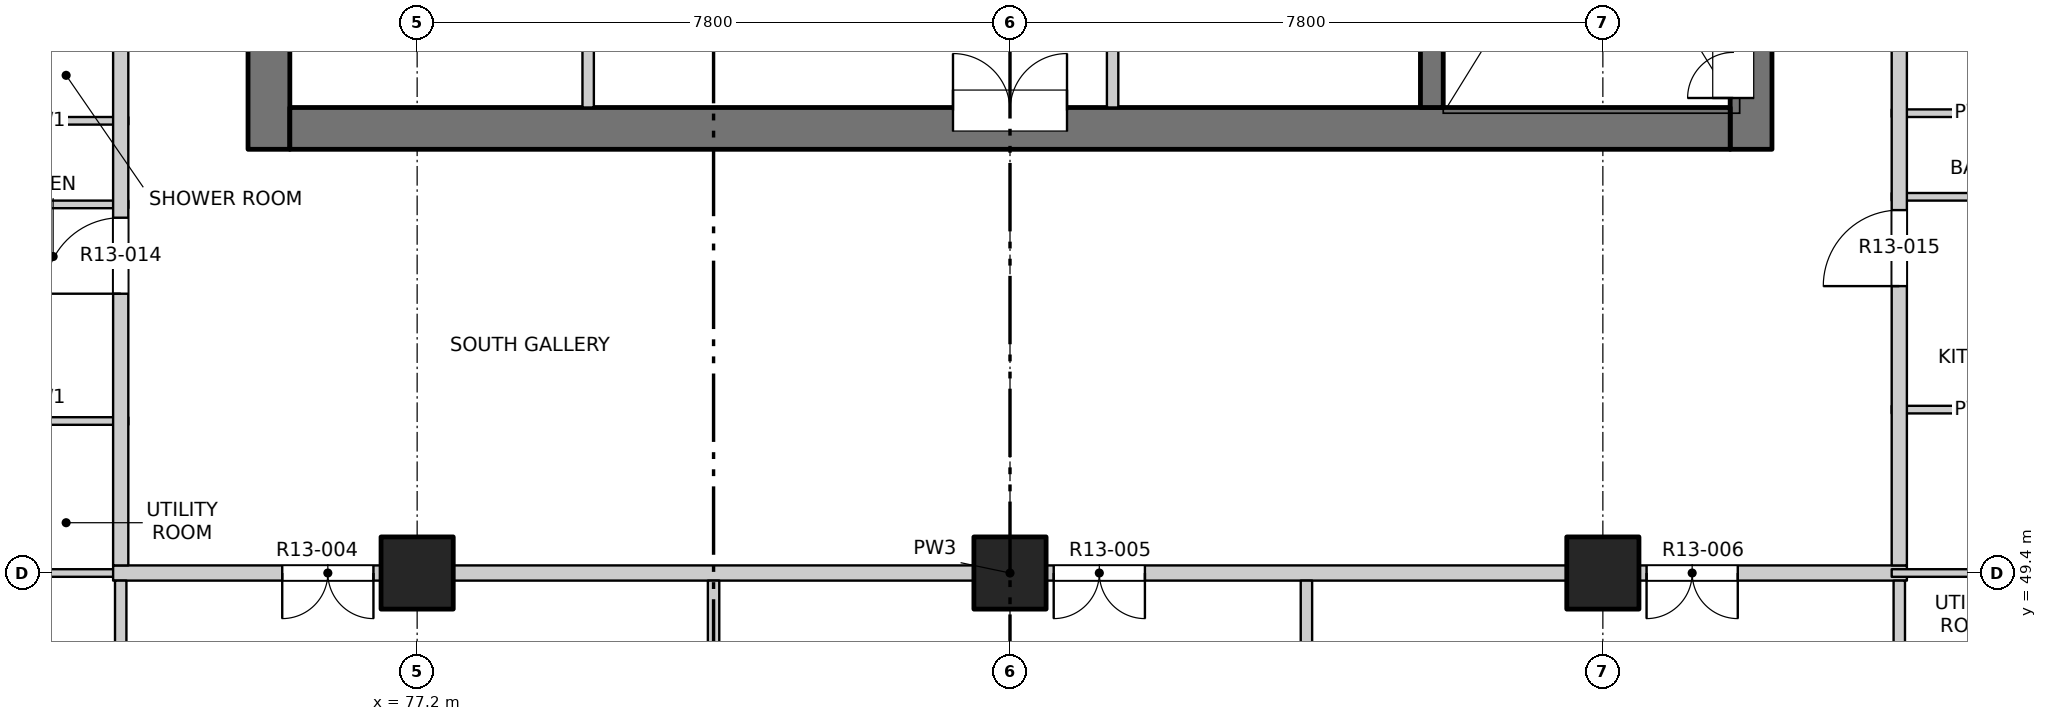
"""IFC4 building model, lengths in metres.
Left out: names, types, materials, properties, quantities, classifications, styles, units other than length and angle.
Written with IfcOpenShell. Run it as: python <this file> out.ifc"""

import sys

from ifc_helpers import new_model, si_unit, direction, frame, frame_2d, origin, origin_2d, place, context, subcontext, project, spatial, rectangle, extrude, element, fill, save


model = new_model("IFC4")
c1 = context("Model", 3, precision=1e-05, world=origin(), true_north=direction((0.0, 1.0)))
c2 = subcontext(c1, "Body", "Model", "MODEL_VIEW")
j1 = project(units=[si_unit("LENGTHUNIT", "METRE"), si_unit("PLANEANGLEUNIT", "RADIAN")], contexts=[c1])
p1 = place(None, origin())
s1 = spatial("IfcSite", under=j1, at=p1, CompositionType="ELEMENT")
p2 = place(p1, origin())
s2 = spatial("IfcBuilding", under=s1, at=p2, CompositionType="ELEMENT")
p3 = place(p2, frame((0.0, 0.0, 140.7)))
s3 = spatial("IfcBuildingStorey", under=s2, at=p3, CompositionType="ELEMENT", Elevation=140.7)
for number, where, z_axis, x_axis in (
    (1, (77.2, 49.4, -0.25), (0.0, 0.0, 1.0), (1.0, 0.0, 0.0)),
    (2, (85.0, 49.4, -0.25), (0.0, 0.0, 1.0), (1.0, 0.0, 0.0)),
    (3, (92.8, 49.4, -0.25), (0.0, 0.0, 1.0), (1.0, 0.0, 0.0)),
):
    element("IfcColumn", number, at=place(p3, frame(where, z_axis=z_axis, x_axis=x_axis)), inside=s3, PredefinedType="COLUMN", context=c2, shape_type="SweptSolid", body=[
        extrude(rectangle(XDim=0.95, YDim=0.95, at=origin_2d()), origin(), (0.0, 0.0, 1.0), 3.35),
    ])
p4 = place(p3, frame((75.25, 54.975, -0.25), z_axis=(0.0, 0.0, 1.0), x_axis=(0.0, 1.0, 0.0)))
e4 = element("IfcWall", 4, at=p4, inside=s3, PredefinedType="SOLIDWALL", context=c2, shape_type="SweptSolid", body=[
    extrude(rectangle(XDim=22.325, YDim=0.55, at=frame_2d((11.163, 0.0))), origin(), (0.0, 0.0, 1.0), 3.35),
])
p5 = place(p4, frame((7.475, 0.0, 0.25)))
e5 = element("IfcOpeningElement", 5, at=p5, cuts=e4, PredefinedType="OPENING", context=c2, shape_type="SweptSolid", body=[
    extrude(rectangle(XDim=0.9, YDim=2.1, at=frame_2d((0.45, 1.05))), frame((0.0, 0.285, 0.0), z_axis=(0.0, -1.0, 0.0), x_axis=(1.0, 0.0, 0.0)), (0.0, 0.0, 1.0), 0.57),
])
p6 = place(p4, frame((10.775, 0.0, 0.25)))
e6 = element("IfcOpeningElement", 6, at=p6, cuts=e4, PredefinedType="OPENING", context=c2, shape_type="SweptSolid", body=[
    extrude(rectangle(XDim=0.9, YDim=2.1, at=frame_2d((0.45, 1.05))), frame((0.0, 0.285, 0.0), z_axis=(0.0, -1.0, 0.0), x_axis=(1.0, 0.0, 0.0)), (0.0, 0.0, 1.0), 0.57),
])
p7 = place(p4, frame((13.775, 0.0, 0.25)))
e7 = element("IfcOpeningElement", 7, at=p7, cuts=e4, PredefinedType="OPENING", context=c2, shape_type="SweptSolid", body=[
    extrude(rectangle(XDim=0.9, YDim=2.1, at=frame_2d((0.45, 1.05))), frame((0.0, 0.285, 0.0), z_axis=(0.0, -1.0, 0.0), x_axis=(1.0, 0.0, 0.0)), (0.0, 0.0, 1.0), 0.57),
])
p8 = place(p4, frame((16.775, 0.0, 0.25)))
e8 = element("IfcOpeningElement", 8, at=p8, cuts=e4, PredefinedType="OPENING", context=c2, shape_type="SweptSolid", body=[
    extrude(rectangle(XDim=0.9, YDim=2.1, at=frame_2d((0.45, 1.05))), frame((0.0, 0.285, 0.0), z_axis=(0.0, -1.0, 0.0), x_axis=(1.0, 0.0, 0.0)), (0.0, 0.0, 1.0), 0.57),
])
p9 = place(p4, frame((20.075, 0.0, 0.25)))
e9 = element("IfcOpeningElement", 9, at=p9, cuts=e4, PredefinedType="OPENING", context=c2, shape_type="SweptSolid", body=[
    extrude(rectangle(XDim=0.9, YDim=2.1, at=frame_2d((0.45, 1.05))), frame((0.0, 0.285, 0.0), z_axis=(0.0, -1.0, 0.0), x_axis=(1.0, 0.0, 0.0)), (0.0, 0.0, 1.0), 0.57),
])
p10 = place(p3, frame((94.75, 54.975, -0.25), z_axis=(0.0, 0.0, 1.0), x_axis=(0.0, 1.0, 0.0)))
e10 = element("IfcWall", 10, at=p10, inside=s3, PredefinedType="SOLIDWALL", context=c2, shape_type="SweptSolid", body=[
    extrude(rectangle(XDim=6.975, YDim=0.55, at=frame_2d((3.487, 0.0))), origin(), (0.0, 0.0, 1.0), 3.35),
])
p11 = place(p10, frame((0.675, 0.0, 0.25)))
e11 = element("IfcOpeningElement", 11, at=p11, cuts=e10, PredefinedType="OPENING", context=c2, shape_type="SweptSolid", body=[
    extrude(rectangle(XDim=1.2, YDim=2.1, at=frame_2d((0.6, 1.05))), frame((0.0, 0.285, 0.0), z_axis=(0.0, -1.0, 0.0), x_axis=(1.0, 0.0, 0.0)), (0.0, 0.0, 1.0), 0.57),
])
p12 = place(p3, frame((75.525, 55.25, -0.25), z_axis=(0.0, 0.0, 1.0), x_axis=(1.0, 0.0, 0.0)))
e12 = element("IfcWall", 12, at=p12, inside=s3, PredefinedType="SOLIDWALL", context=c2, shape_type="SweptSolid", body=[
    extrude(rectangle(XDim=18.95, YDim=0.55, at=frame_2d((9.475, 0.0))), origin(), (0.0, 0.0, 1.0), 3.35),
])
p13 = place(p12, frame((8.725, 0.0, 0.25)))
e13 = element("IfcOpeningElement", 13, at=p13, cuts=e12, PredefinedType="OPENING", context=c2, shape_type="SweptSolid", body=[
    extrude(rectangle(XDim=1.5, YDim=2.1, at=frame_2d((0.75, 1.05))), frame((0.0, 0.285, 0.0), z_axis=(0.0, -1.0, 0.0), x_axis=(1.0, 0.0, 0.0)), (0.0, 0.0, 1.0), 0.57),
])
p14 = place(p3, frame((90.55, 55.525, -0.25), z_axis=(0.0, 0.0, 1.0), x_axis=(0.0, 1.0, 0.0)))
e14 = element("IfcWall", 14, at=p14, inside=s3, PredefinedType="SOLIDWALL", context=c2, shape_type="SweptSolid", body=[
    extrude(rectangle(XDim=6.425, YDim=0.3, at=frame_2d((3.212, 0.0))), origin(), (0.0, 0.0, 1.0), 3.35),
])
p15 = place(p3, frame((65.8, 49.4, 0.0), z_axis=(0.0, 0.0, 1.0), x_axis=(1.0, 0.0, 0.0)))
e15 = element("IfcWall", 15, at=p15, inside=s3, PredefinedType="PARTITIONING", context=c2, shape_type="SweptSolid", body=[
    extrude(rectangle(XDim=7.6, YDim=0.1, at=frame_2d((3.8, 0.0))), origin(), (0.0, 0.0, 1.0), 3.1),
])
p16 = place(p15, frame((4.19, 0.0, 0.0)))
e16 = element("IfcOpeningElement", 16, at=p16, cuts=e15, PredefinedType="OPENING", context=c2, shape_type="SweptSolid", body=[
    extrude(rectangle(XDim=0.9, YDim=2.1, at=frame_2d((0.45, 1.05))), frame((0.0, 0.06, 0.0), z_axis=(0.0, -1.0, 0.0), x_axis=(1.0, 0.0, 0.0)), (0.0, 0.0, 1.0), 0.12),
])
p17 = place(p3, frame((73.2, 49.4, 0.0), z_axis=(0.0, 0.0, 1.0), x_axis=(1.0, 0.0, 0.0)))
e17 = element("IfcWall", 17, at=p17, inside=s3, PredefinedType="PARTITIONING", context=c2, shape_type="SweptSolid", body=[
    extrude(rectangle(XDim=23.6, YDim=0.2, at=frame_2d((11.8, 0.0))), origin(), (0.0, 0.0, 1.0), 3.1),
])
p18 = place(p17, frame((2.225, 0.0, 0.0)))
e18 = element("IfcOpeningElement", 18, at=p18, cuts=e17, PredefinedType="OPENING", context=c2, shape_type="SweptSolid", body=[
    extrude(rectangle(XDim=1.2, YDim=2.1, at=frame_2d((0.6, 1.05))), frame((0.0, 0.11, 0.0), z_axis=(0.0, -1.0, 0.0), x_axis=(1.0, 0.0, 0.0)), (0.0, 0.0, 1.0), 0.22),
])
p19 = place(p17, frame((12.375, 0.0, 0.0)))
e19 = element("IfcOpeningElement", 19, at=p19, cuts=e17, PredefinedType="OPENING", context=c2, shape_type="SweptSolid", body=[
    extrude(rectangle(XDim=1.2, YDim=2.1, at=frame_2d((0.6, 1.05))), frame((0.0, 0.11, 0.0), z_axis=(0.0, -1.0, 0.0), x_axis=(1.0, 0.0, 0.0)), (0.0, 0.0, 1.0), 0.22),
])
p20 = place(p17, frame((20.175, 0.0, 0.0)))
e20 = element("IfcOpeningElement", 20, at=p20, cuts=e17, PredefinedType="OPENING", context=c2, shape_type="SweptSolid", body=[
    extrude(rectangle(XDim=1.2, YDim=2.1, at=frame_2d((0.6, 1.05))), frame((0.0, 0.11, 0.0), z_axis=(0.0, -1.0, 0.0), x_axis=(1.0, 0.0, 0.0)), (0.0, 0.0, 1.0), 0.22),
])
p21 = place(p3, frame((96.6, 49.4, 0.0), z_axis=(0.0, 0.0, 1.0), x_axis=(1.0, 0.0, 0.0)))
e21 = element("IfcWall", 21, at=p21, inside=s3, PredefinedType="PARTITIONING", context=c2, shape_type="SweptSolid", body=[
    extrude(rectangle(XDim=7.6, YDim=0.1, at=frame_2d((3.8, 0.0))), origin(), (0.0, 0.0, 1.0), 3.1),
])
p22 = place(p21, frame((2.51, 0.0, 0.0)))
e22 = element("IfcOpeningElement", 22, at=p22, cuts=e21, PredefinedType="OPENING", context=c2, shape_type="SweptSolid", body=[
    extrude(rectangle(XDim=0.9, YDim=2.1, at=frame_2d((0.45, 1.05))), frame((0.0, 0.06, 0.0), z_axis=(0.0, -1.0, 0.0), x_axis=(1.0, 0.0, 0.0)), (0.0, 0.0, 1.0), 0.12),
])
for number, where, z_axis, x_axis in (
    (23, (71.18, 51.4, 0.0), (0.0, 0.0, 1.0), (1.0, 0.0, 0.0)),
    (24, (96.6, 51.55, 0.0), (0.0, 0.0, 1.0), (1.0, 0.0, 0.0)),
    (25, (71.18, 54.25, 0.0), (0.0, 0.0, 1.0), (1.0, 0.0, 0.0)),
    (26, (96.6, 54.35, 0.0), (0.0, 0.0, 1.0), (1.0, 0.0, 0.0)),
    (27, (71.18, 55.35, 0.0), (0.0, 0.0, 1.0), (1.0, 0.0, 0.0)),
    (28, (96.6, 55.45, 0.0), (0.0, 0.0, 1.0), (1.0, 0.0, 0.0)),
):
    element("IfcWall", number, at=place(p3, frame(where, z_axis=z_axis, x_axis=x_axis)), inside=s3, PredefinedType="PARTITIONING", context=c2, shape_type="SweptSolid", body=[
        extrude(rectangle(XDim=2.22, YDim=0.1, at=frame_2d((1.11, 0.0))), origin(), (0.0, 0.0, 1.0), 3.1),
    ])
p23 = place(p3, frame((73.3, 45.8, 0.0), z_axis=(0.0, 0.0, 1.0), x_axis=(0.0, 1.0, 0.0)))
e29 = element("IfcWall", 29, at=p23, inside=s3, PredefinedType="PARTITIONING", context=c2, shape_type="SweptSolid", body=[
    extrude(rectangle(XDim=3.5, YDim=0.15, at=frame_2d((1.75, 0.0))), origin(), (0.0, 0.0, 1.0), 3.1),
])
p24 = place(p3, frame((73.3, 49.5, 0.0), z_axis=(0.0, 0.0, 1.0), x_axis=(0.0, 1.0, 0.0)))
e30 = element("IfcWall", 30, at=p24, inside=s3, PredefinedType="PARTITIONING", context=c2, shape_type="SweptSolid", body=[
    extrude(rectangle(XDim=34.7, YDim=0.2, at=frame_2d((17.35, 0.0))), origin(), (0.0, 0.0, 1.0), 3.1),
])
p25 = place(p24, frame((3.575, 0.0, 0.0)))
e31 = element("IfcOpeningElement", 31, at=p25, cuts=e30, PredefinedType="OPENING", context=c2, shape_type="SweptSolid", body=[
    extrude(rectangle(XDim=1.0, YDim=2.1, at=frame_2d((0.5, 1.05))), frame((0.0, 0.11, 0.0), z_axis=(0.0, -1.0, 0.0), x_axis=(1.0, 0.0, 0.0)), (0.0, 0.0, 1.0), 0.22),
])
p26 = place(p24, frame((21.975, 0.0, 0.0)))
e32 = element("IfcOpeningElement", 32, at=p26, cuts=e30, PredefinedType="OPENING", context=c2, shape_type="SweptSolid", body=[
    extrude(rectangle(XDim=1.0, YDim=2.1, at=frame_2d((0.5, 1.05))), frame((0.0, 0.11, 0.0), z_axis=(0.0, -1.0, 0.0), x_axis=(1.0, 0.0, 0.0)), (0.0, 0.0, 1.0), 0.22),
])
p27 = place(p24, frame((29.125, 0.0, 0.0)))
e33 = element("IfcOpeningElement", 33, at=p27, cuts=e30, PredefinedType="OPENING", context=c2, shape_type="SweptSolid", body=[
    extrude(rectangle(XDim=1.0, YDim=2.1, at=frame_2d((0.5, 1.05))), frame((0.0, 0.11, 0.0), z_axis=(0.0, -1.0, 0.0), x_axis=(1.0, 0.0, 0.0)), (0.0, 0.0, 1.0), 0.22),
])
p28 = place(p3, frame((79.45, 55.525, 0.0), z_axis=(0.0, 0.0, 1.0), x_axis=(0.0, 1.0, 0.0)))
e34 = element("IfcWall", 34, at=p28, inside=s3, PredefinedType="PARTITIONING", context=c2, shape_type="SweptSolid", body=[
    extrude(rectangle(XDim=5.375, YDim=0.15, at=frame_2d((2.688, 0.0))), origin(), (0.0, 0.0, 1.0), 3.1),
])
p29 = place(p28, frame((2.175, 0.0, 0.0)))
e35 = element("IfcOpeningElement", 35, at=p29, cuts=e34, PredefinedType="OPENING", context=c2, shape_type="SweptSolid", body=[
    extrude(rectangle(XDim=0.9, YDim=2.1, at=frame_2d((0.45, 1.05))), frame((0.0, 0.085, 0.0), z_axis=(0.0, -1.0, 0.0), x_axis=(1.0, 0.0, 0.0)), (0.0, 0.0, 1.0), 0.17),
])
p30 = place(p3, frame((81.1, 45.8, 0.0), z_axis=(0.0, 0.0, 1.0), x_axis=(0.0, 1.0, 0.0)))
e36 = element("IfcWall", 36, at=p30, inside=s3, PredefinedType="PARTITIONING", context=c2, shape_type="SweptSolid", body=[
    extrude(rectangle(XDim=3.5, YDim=0.15, at=frame_2d((1.75, 0.0))), origin(), (0.0, 0.0, 1.0), 3.1),
])
p31 = place(p3, frame((86.35, 55.525, 0.0), z_axis=(0.0, 0.0, 1.0), x_axis=(0.0, 1.0, 0.0)))
e37 = element("IfcWall", 37, at=p31, inside=s3, PredefinedType="PARTITIONING", context=c2, shape_type="SweptSolid", body=[
    extrude(rectangle(XDim=5.5, YDim=0.15, at=frame_2d((2.75, 0.0))), origin(), (0.0, 0.0, 1.0), 3.1),
])
p32 = place(p31, frame((2.175, 0.0, 0.0)))
e38 = element("IfcOpeningElement", 38, at=p32, cuts=e37, PredefinedType="OPENING", context=c2, shape_type="SweptSolid", body=[
    extrude(rectangle(XDim=0.9, YDim=2.1, at=frame_2d((0.45, 1.05))), frame((0.0, 0.085, 0.0), z_axis=(0.0, -1.0, 0.0), x_axis=(1.0, 0.0, 0.0)), (0.0, 0.0, 1.0), 0.17),
])
for number, where, z_axis, x_axis in (
    (39, (88.9, 45.8, 0.0), (0.0, 0.0, 1.0), (0.0, 1.0, 0.0)),
    (40, (96.7, 45.8, 0.0), (0.0, 0.0, 1.0), (0.0, 1.0, 0.0)),
):
    element("IfcWall", number, at=place(p3, frame(where, z_axis=z_axis, x_axis=x_axis)), inside=s3, PredefinedType="PARTITIONING", context=c2, shape_type="SweptSolid", body=[
        extrude(rectangle(XDim=3.5, YDim=0.15, at=frame_2d((1.75, 0.0))), origin(), (0.0, 0.0, 1.0), 3.1),
    ])
p33 = place(p3, frame((96.7, 49.5, 0.0), z_axis=(0.0, 0.0, 1.0), x_axis=(0.0, 1.0, 0.0)))
e41 = element("IfcWall", 41, at=p33, inside=s3, PredefinedType="PARTITIONING", context=c2, shape_type="SweptSolid", body=[
    extrude(rectangle(XDim=34.7, YDim=0.2, at=frame_2d((17.35, 0.0))), origin(), (0.0, 0.0, 1.0), 3.1),
])
p34 = place(p33, frame((3.675, 0.0, 0.0)))
e42 = element("IfcOpeningElement", 42, at=p34, cuts=e41, PredefinedType="OPENING", context=c2, shape_type="SweptSolid", body=[
    extrude(rectangle(XDim=1.0, YDim=2.1, at=frame_2d((0.5, 1.05))), frame((0.0, 0.11, 0.0), z_axis=(0.0, -1.0, 0.0), x_axis=(1.0, 0.0, 0.0)), (0.0, 0.0, 1.0), 0.22),
])
p35 = place(p33, frame((21.725, 0.0, 0.0)))
e43 = element("IfcOpeningElement", 43, at=p35, cuts=e41, PredefinedType="OPENING", context=c2, shape_type="SweptSolid", body=[
    extrude(rectangle(XDim=1.0, YDim=2.1, at=frame_2d((0.5, 1.05))), frame((0.0, 0.11, 0.0), z_axis=(0.0, -1.0, 0.0), x_axis=(1.0, 0.0, 0.0)), (0.0, 0.0, 1.0), 0.22),
])
p36 = place(p33, frame((29.125, 0.0, 0.0)))
e44 = element("IfcOpeningElement", 44, at=p36, cuts=e41, PredefinedType="OPENING", context=c2, shape_type="SweptSolid", body=[
    extrude(rectangle(XDim=1.0, YDim=2.1, at=frame_2d((0.5, 1.05))), frame((0.0, 0.11, 0.0), z_axis=(0.0, -1.0, 0.0), x_axis=(1.0, 0.0, 0.0)), (0.0, 0.0, 1.0), 0.22),
])
p37 = place(p18, origin())
e45 = element("IfcDoor", 45, at=p37, inside=s3, OperationType="DOUBLE_DOOR_SINGLE_SWING", PredefinedType="DOOR", context=c2, shape_type="SweptSolid", body=[
    extrude(rectangle(XDim=1.2, YDim=2.1, at=frame_2d((0.6, 1.05))), frame((0.0, 0.025, 0.0), z_axis=(0.0, -1.0, 0.0), x_axis=(1.0, 0.0, 0.0)), (0.0, 0.0, 1.0), 0.05),
])
fill(e18, e45)
p38 = place(p19, origin())
e46 = element("IfcDoor", 46, at=p38, inside=s3, OperationType="DOUBLE_DOOR_SINGLE_SWING", PredefinedType="DOOR", context=c2, shape_type="SweptSolid", body=[
    extrude(rectangle(XDim=1.2, YDim=2.1, at=frame_2d((0.6, 1.05))), frame((0.0, 0.025, 0.0), z_axis=(0.0, -1.0, 0.0), x_axis=(1.0, 0.0, 0.0)), (0.0, 0.0, 1.0), 0.05),
])
fill(e19, e46)
p39 = place(p20, origin())
e47 = element("IfcDoor", 47, at=p39, inside=s3, OperationType="DOUBLE_DOOR_SINGLE_SWING", PredefinedType="DOOR", context=c2, shape_type="SweptSolid", body=[
    extrude(rectangle(XDim=1.2, YDim=2.1, at=frame_2d((0.6, 1.05))), frame((0.0, 0.025, 0.0), z_axis=(0.0, -1.0, 0.0), x_axis=(1.0, 0.0, 0.0)), (0.0, 0.0, 1.0), 0.05),
])
fill(e20, e47)
p40 = place(p25, origin())
e48 = element("IfcDoor", 48, at=p40, inside=s3, OperationType="SINGLE_SWING_LEFT", PredefinedType="DOOR", context=c2, shape_type="SweptSolid", body=[
    extrude(rectangle(XDim=1.0, YDim=2.1, at=frame_2d((0.5, 1.05))), frame((0.0, 0.025, 0.0), z_axis=(0.0, -1.0, 0.0), x_axis=(1.0, 0.0, 0.0)), (0.0, 0.0, 1.0), 0.05),
])
fill(e31, e48)
p41 = place(p34, origin())
e49 = element("IfcDoor", 49, at=p41, inside=s3, OperationType="SINGLE_SWING_RIGHT", PredefinedType="DOOR", context=c2, shape_type="SweptSolid", body=[
    extrude(rectangle(XDim=1.0, YDim=2.1, at=frame_2d((0.5, 1.05))), frame((0.0, 0.025, 0.0), z_axis=(0.0, -1.0, 0.0), x_axis=(1.0, 0.0, 0.0)), (0.0, 0.0, 1.0), 0.05),
])
fill(e42, e49)
p42 = place(p13, origin())
e50 = element("IfcDoor", 50, at=p42, inside=s3, OperationType="DOUBLE_DOOR_SINGLE_SWING", PredefinedType="DOOR", context=c2, shape_type="SweptSolid", body=[
    extrude(rectangle(XDim=1.5, YDim=2.1, at=frame_2d((0.75, 1.05))), frame((0.0, 0.26, 0.0), z_axis=(0.0, -1.0, 0.0), x_axis=(1.0, 0.0, 0.0)), (0.0, 0.0, 1.0), 0.05),
])
fill(e13, e50)
p43 = place(p11, origin())
e51 = element("IfcDoor", 51, at=p43, inside=s3, OperationType="DOUBLE_DOOR_SINGLE_SWING", PredefinedType="DOOR", context=c2, shape_type="SweptSolid", body=[
    extrude(rectangle(XDim=1.2, YDim=2.1, at=frame_2d((0.6, 1.05))), frame((0.0, 0.26, 0.0), z_axis=(0.0, -1.0, 0.0), x_axis=(1.0, 0.0, 0.0)), (0.0, 0.0, 1.0), 0.05),
])
fill(e11, e51)
save(model, sys.argv[1])
